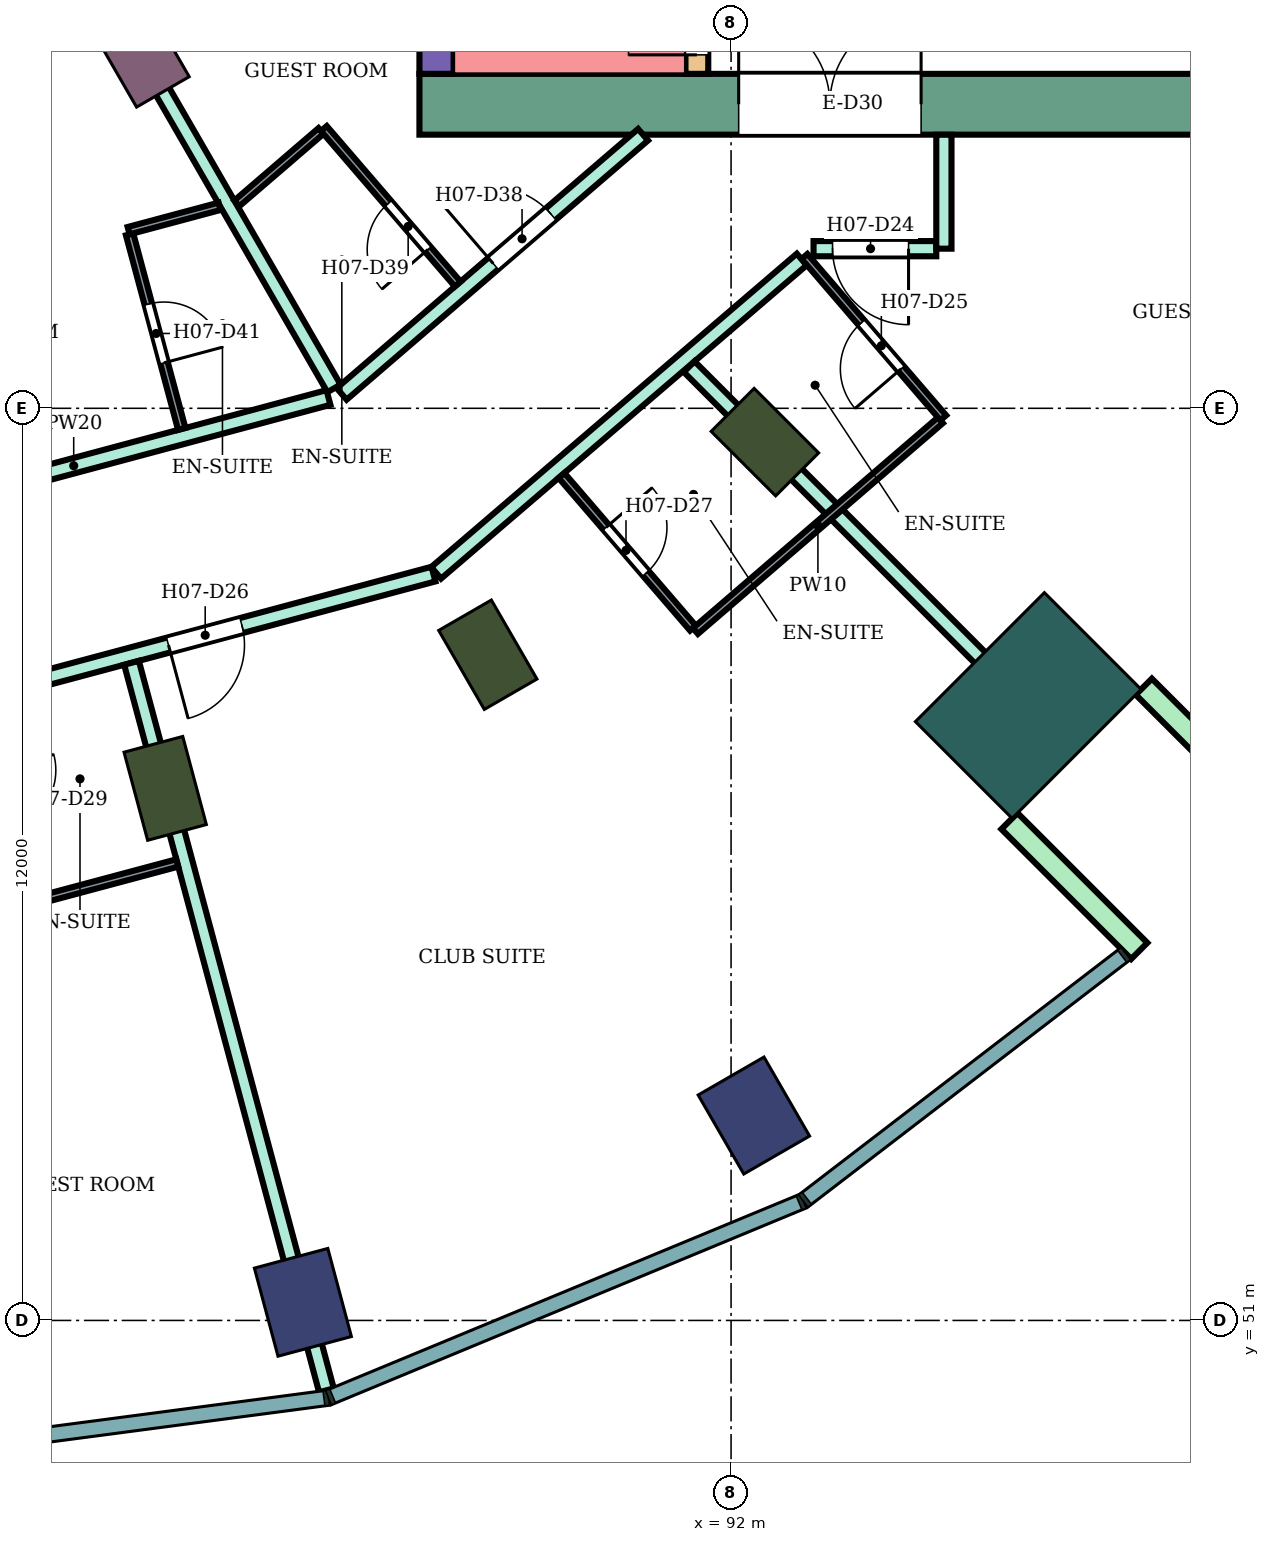
"""IFC4 building model, lengths in metres.
Left out: names, types, materials, properties, quantities, classifications, styles, units other than length and angle.
Written with IfcOpenShell. Run it as: python <this file> out.ifc"""

import sys

from ifc_helpers import new_model, si_unit, direction, frame, frame_2d, origin, origin_2d, place, context, subcontext, project, spatial, rectangle, extrude, element, fill, save


model = new_model("IFC4")
c1 = context("Model", 3, precision=1e-05, world=origin(), true_north=direction((0.0, 1.0)))
c2 = subcontext(c1, "Body", "Model", "MODEL_VIEW")
j1 = project(units=[si_unit("LENGTHUNIT", "METRE"), si_unit("PLANEANGLEUNIT", "RADIAN")], contexts=[c1])
p1 = place(None, origin())
s1 = spatial("IfcSite", under=j1, at=p1, CompositionType="ELEMENT")
p2 = place(p1, origin())
s2 = spatial("IfcBuilding", under=s1, at=p2, CompositionType="ELEMENT")
p3 = place(p2, frame((0.0, 0.0, 105.2)))
s3 = spatial("IfcBuildingStorey", under=s2, at=p3, CompositionType="ELEMENT", Elevation=105.2)
for number, where, z_axis, x_axis in (
    (1, (86.367, 51.238, 0.0), (0.0, 0.0, 1.0), (0.259, -0.966, 0.0)),
    (2, (92.3, 53.696, 0.0), (0.0, 0.0, 1.0), (0.5, -0.866, 0.0)),
):
    element("IfcColumn", number, at=place(p3, frame(where, z_axis=z_axis, x_axis=x_axis)), inside=s3, PredefinedType="COLUMN", context=c2, shape_type="SweptSolid", body=[
        extrude(rectangle(XDim=1.2, YDim=1.0, at=origin_2d()), origin(), (0.0, 0.0, 1.0), 3.8),
    ])
for number, where, z_axis, x_axis in (
    (3, (84.555, 58.0, 0.0), (0.0, 0.0, 1.0), (0.259, -0.966, 0.0)),
    (4, (88.8, 59.758, 0.0), (0.0, 0.0, 1.0), (0.5, -0.866, 0.0)),
    (5, (92.445, 62.555, 0.0), (0.0, 0.0, 1.0), (0.707, -0.707, 0.0)),
):
    element("IfcColumn", number, at=place(p3, frame(where, z_axis=z_axis, x_axis=x_axis)), inside=s3, PredefinedType="COLUMN", context=c2, shape_type="SweptSolid", body=[
        extrude(rectangle(XDim=1.2, YDim=0.8, at=origin_2d()), origin(), (0.0, 0.0, 1.0), 3.8),
    ])
p4 = place(p3, frame((84.3, 67.552, 0.0), z_axis=(0.0, 0.0, 1.0), x_axis=(0.5, -0.866025403784, 0.0)))
e6 = element("IfcColumn", 6, at=p4, inside=s3, PredefinedType="COLUMN", context=c2, shape_type="SweptSolid", body=[
    extrude(rectangle(XDim=0.9, YDim=0.8, at=origin_2d()), origin(), (0.0, 0.0, 1.0), 3.8),
])
p5 = place(p3, frame((95.91, 59.09, 0.0), z_axis=(0.0, 0.0, 1.0), x_axis=(0.707106781187, -0.707106781187, 0.0)))
e7 = element("IfcColumn", 7, at=p5, inside=s3, PredefinedType="COLUMN", context=c2, shape_type="SweptSolid", body=[
    extrude(rectangle(XDim=1.8, YDim=2.4, at=origin_2d()), origin(), (0.0, 0.0, 1.0), 3.8),
])
p6 = place(p3, frame((87.9, 67.0, 0.0), z_axis=(0.0, 0.0, 1.0), x_axis=(1.0, 0.0, 0.0)))
e8 = element("IfcWall", 8, at=p6, inside=s3, PredefinedType="SHEAR", context=c2, shape_type="SweptSolid", body=[
    extrude(rectangle(XDim=14.7, YDim=0.8, at=frame_2d((7.35, 0.0))), origin(), (0.0, 0.0, 1.0), 3.45),
])
p7 = place(p6, frame((4.2, 0.0, 0.0)))
e9 = element("IfcOpeningElement", 9, at=p7, cuts=e8, PredefinedType="OPENING", context=c2, shape_type="SweptSolid", body=[
    extrude(rectangle(XDim=2.4, YDim=2.4, at=frame_2d((1.2, 1.2))), frame((0.0, 0.41, 0.0), z_axis=(0.0, -1.0, 0.0), x_axis=(1.0, 0.0, 0.0)), (0.0, 0.0, 1.0), 0.82),
])
p8 = place(p3, frame((88.125, 67.4, 0.0), z_axis=(0.0, 0.0, 1.0), x_axis=(0.0, 1.0, 0.0)))
e10 = element("IfcWall", 10, at=p8, inside=s3, PredefinedType="SHEAR", context=c2, shape_type="SweptSolid", body=[
    extrude(rectangle(XDim=7.6, YDim=0.45, at=frame_2d((3.8, 0.0))), origin(), (0.0, 0.0, 1.0), 3.45),
])
p9 = place(p3, frame((91.55, 67.4, 0.0), z_axis=(0.0, 0.0, 1.0), x_axis=(0.0, 1.0, 0.0)))
e11 = element("IfcWall", 11, at=p9, inside=s3, PredefinedType="SHEAR", context=c2, shape_type="SweptSolid", body=[
    extrude(rectangle(XDim=7.6, YDim=0.3, at=frame_2d((3.8, 0.0))), origin(), (0.0, 0.0, 1.0), 3.45),
])
p10 = place(p9, frame((0.25, 0.0, 0.0)))
e12 = element("IfcOpeningElement", 12, at=p10, cuts=e11, PredefinedType="OPENING", context=c2, shape_type="SweptSolid", body=[
    extrude(rectangle(XDim=0.9, YDim=2.1, at=frame_2d((0.45, 1.05))), frame((0.0, 0.16, 0.0), z_axis=(0.0, -1.0, 0.0), x_axis=(1.0, 0.0, 0.0)), (0.0, 0.0, 1.0), 0.32),
])
for number, where, z_axis, x_axis in (
    (13, (95.662, 57.57, 0.0), (0.0, 0.0, 1.0), (0.707, -0.707, 0.0)),
    (14, (97.43, 59.338, 0.0), (0.0, 0.0, 1.0), (0.707, -0.707, 0.0)),
):
    element("IfcWall", number, at=place(p3, frame(where, z_axis=z_axis, x_axis=x_axis)), inside=s3, PredefinedType="NOTDEFINED", context=c2, shape_type="SweptSolid", body=[
        extrude(rectangle(XDim=2.416, YDim=0.3, at=frame_2d((1.208, 0.0))), origin(), (0.0, 0.0, 1.0), 3.8),
    ])
p11 = place(p3, frame((80.0, 67.396, 0.0), z_axis=(0.0, 0.0, 1.0), x_axis=(0.965933654434, 0.258789828301, 0.0)))
e15 = element("IfcWall", 15, at=p11, inside=s3, PredefinedType="NOTDEFINED", context=c2, shape_type="SweptSolid", body=[
    extrude(rectangle(XDim=3.936, YDim=0.2, at=frame_2d((1.968, 0.0))), origin(), (0.0, 0.0, 1.0), 3.8),
])
p12 = place(p11, frame((0.468, 0.0, 0.9)))
e16 = element("IfcOpeningElement", 16, at=p12, cuts=e15, PredefinedType="OPENING", context=c2, shape_type="SweptSolid", body=[
    extrude(rectangle(XDim=3.0, YDim=2.3, at=frame_2d((1.5, 1.15))), frame((0.0, 0.11, 0.0), z_axis=(0.0, -1.0, 0.0), x_axis=(1.0, 0.0, 0.0)), (0.0, 0.0, 1.0), 0.22),
])
p13 = place(p3, frame((80.0, 58.654, 0.0), z_axis=(0.0, 0.0, 1.0), x_axis=(0.965979808777, 0.25861749561, 0.0)))
e17 = element("IfcWall", 17, at=p13, inside=s3, PredefinedType="PARTITIONING", context=c2, shape_type="SweptSolid", body=[
    extrude(rectangle(XDim=8.37, YDim=0.2, at=frame_2d((4.185, 0.0))), origin(), (0.0, 0.0, 1.0), 3.35),
])
p14 = place(p13, frame((4.76, 0.0, 0.0)))
e18 = element("IfcOpeningElement", 18, at=p14, cuts=e17, PredefinedType="OPENING", context=c2, shape_type="SweptSolid", body=[
    extrude(rectangle(XDim=1.0, YDim=2.1, at=frame_2d((0.5, 1.05))), frame((0.0, 0.11, 0.0), z_axis=(0.0, -1.0, 0.0), x_axis=(1.0, 0.0, 0.0)), (0.0, 0.0, 1.0), 0.22),
])
p15 = place(p13, frame((0.55, 0.0, 0.0)))
e19 = element("IfcOpeningElement", 19, at=p15, cuts=e17, PredefinedType="OPENING", context=c2, shape_type="SweptSolid", body=[
    extrude(rectangle(XDim=1.0, YDim=2.1, at=frame_2d((0.5, 1.05))), frame((0.0, 0.11, 0.0), z_axis=(0.0, -1.0, 0.0), x_axis=(1.0, 0.0, 0.0)), (0.0, 0.0, 1.0), 0.22),
])
p16 = place(p3, frame((80.0, 61.346, 0.0), z_axis=(0.0, 0.0, 1.0), x_axis=(0.965924181808, 0.258825182312, 0.0)))
e20 = element("IfcWall", 20, at=p16, inside=s3, PredefinedType="PARTITIONING", context=c2, shape_type="SweptSolid", body=[
    extrude(rectangle(XDim=6.94, YDim=0.2, at=frame_2d((3.47, 0.0))), origin(), (0.0, 0.0, 1.0), 3.35),
])
p17 = place(p16, frame((0.55, 0.0, 0.0)))
e21 = element("IfcOpeningElement", 21, at=p17, cuts=e20, PredefinedType="OPENING", context=c2, shape_type="SweptSolid", body=[
    extrude(rectangle(XDim=1.0, YDim=2.1, at=frame_2d((0.5, 1.05))), frame((0.0, 0.11, 0.0), z_axis=(0.0, -1.0, 0.0), x_axis=(1.0, 0.0, 0.0)), (0.0, 0.0, 1.0), 0.22),
])
p18 = place(p3, frame((83.849, 68.333, 0.0), z_axis=(0.0, 0.0, 1.0), x_axis=(0.499901724708, -0.866082135617, 0.0)))
e22 = element("IfcWall", 22, at=p18, inside=s3, PredefinedType="PARTITIONING", context=c2, shape_type="SweptSolid", body=[
    extrude(rectangle(XDim=5.855, YDim=0.2, at=frame_2d((2.928, 0.0))), origin(), (0.0, 0.0, 1.0), 3.35),
])
p19 = place(p3, frame((84.112, 59.652, 0.0), z_axis=(0.0, 0.0, 1.0), x_axis=(0.25878658041, -0.965934524593, 0.0)))
e23 = element("IfcWall", 23, at=p19, inside=s3, PredefinedType="PARTITIONING", context=c2, shape_type="SweptSolid", body=[
    extrude(rectangle(XDim=9.909, YDim=0.2, at=frame_2d((4.954, 0.0))), origin(), (0.0, 0.0, 1.0), 3.35),
])
p20 = place(p3, frame((86.877, 63.189, 0.0), z_axis=(0.0, 0.0, 1.0), x_axis=(0.758164888471, 0.652062881853, 0.0)))
e24 = element("IfcWall", 24, at=p20, inside=s3, PredefinedType="PARTITIONING", context=c2, shape_type="SweptSolid", body=[
    extrude(rectangle(XDim=5.23, YDim=0.2, at=frame_2d((2.615, 0.0))), origin(), (0.0, 0.0, 1.0), 3.35),
])
p21 = place(p20, frame((2.63, 0.0, 0.0)))
e25 = element("IfcOpeningElement", 25, at=p21, cuts=e24, PredefinedType="OPENING", context=c2, shape_type="SweptSolid", body=[
    extrude(rectangle(XDim=1.0, YDim=2.1, at=frame_2d((0.5, 1.05))), frame((0.0, 0.11, 0.0), z_axis=(0.0, -1.0, 0.0), x_axis=(1.0, 0.0, 0.0)), (0.0, 0.0, 1.0), 0.22),
])
p22 = place(p3, frame((88.119, 60.835, 0.0), z_axis=(0.0, 0.0, 1.0), x_axis=(0.759278362444, 0.650765985838, 0.0)))
e26 = element("IfcWall", 26, at=p22, inside=s3, PredefinedType="PARTITIONING", context=c2, shape_type="SweptSolid", body=[
    extrude(rectangle(XDim=6.336, YDim=0.2, at=frame_2d((3.168, 0.0))), origin(), (0.0, 0.0, 1.0), 3.35),
])
p23 = place(p3, frame((91.449, 63.547, 0.0), z_axis=(0.0, 0.0, 1.0), x_axis=(0.706984798626, -0.707228742708, 0.0)))
e27 = element("IfcWall", 27, at=p23, inside=s3, PredefinedType="PARTITIONING", context=c2, shape_type="SweptSolid", body=[
    extrude(rectangle(XDim=7.006, YDim=0.2, at=frame_2d((3.503, 0.0))), origin(), (0.0, 0.0, 1.0), 3.35),
])
p24 = place(p3, frame((93.085, 65.1, 0.0), z_axis=(0.0, 0.0, 1.0), x_axis=(1.0, 0.0, 0.0)))
e28 = element("IfcWall", 28, at=p24, inside=s3, PredefinedType="PARTITIONING", context=c2, shape_type="SweptSolid", body=[
    extrude(rectangle(XDim=1.615, YDim=0.2, at=frame_2d((0.808, 0.0))), origin(), (0.0, 0.0, 1.0), 3.35),
])
p25 = place(p24, frame((0.25, 0.0, 0.0)))
e29 = element("IfcOpeningElement", 29, at=p25, cuts=e28, PredefinedType="OPENING", context=c2, shape_type="SweptSolid", body=[
    extrude(rectangle(XDim=1.0, YDim=2.1, at=frame_2d((0.5, 1.05))), frame((0.0, 0.11, 0.0), z_axis=(0.0, -1.0, 0.0), x_axis=(1.0, 0.0, 0.0)), (0.0, 0.0, 1.0), 0.22),
])
p26 = place(p3, frame((94.8, 65.1, 0.0), z_axis=(0.0, 0.0, 1.0), x_axis=(0.0, 1.0, 0.0)))
e30 = element("IfcWall", 30, at=p26, inside=s3, PredefinedType="PARTITIONING", context=c2, shape_type="SweptSolid", body=[
    extrude(rectangle(XDim=1.499, YDim=0.2, at=frame_2d((0.75, 0.0))), origin(), (0.0, 0.0, 1.0), 3.35),
])
p27 = place(p3, frame((82.782, 56.501, 0.0), z_axis=(0.0, 0.0, 1.0), x_axis=(0.966003594778, 0.258528634539, 0.0)))
e31 = element("IfcWall", 31, at=p27, inside=s3, PredefinedType="PARTITIONING", context=c2, shape_type="SweptSolid", body=[
    extrude(rectangle(XDim=2.0, YDim=0.1, at=frame_2d((1.0, 0.0))), origin(), (0.0, 0.0, 1.0), 3.35),
])
p28 = place(p3, frame((84.087, 65.289, 0.0), z_axis=(0.0, 0.0, 1.0), x_axis=(0.258929459649, -0.965896234037, 0.0)))
e32 = element("IfcWall", 32, at=p28, inside=s3, PredefinedType="PARTITIONING", context=c2, shape_type="SweptSolid", body=[
    extrude(rectangle(XDim=2.65, YDim=0.1, at=frame_2d((1.325, 0.0))), origin(), (0.0, 0.0, 1.0), 3.35),
])
p29 = place(p28, frame((0.95, 0.0, 0.0)))
e33 = element("IfcOpeningElement", 33, at=p29, cuts=e32, PredefinedType="OPENING", context=c2, shape_type="SweptSolid", body=[
    extrude(rectangle(XDim=0.8, YDim=2.1, at=frame_2d((0.4, 1.05))), frame((0.0, 0.06, 0.0), z_axis=(0.0, -1.0, 0.0), x_axis=(1.0, 0.0, 0.0)), (0.0, 0.0, 1.0), 0.12),
])
p30 = place(p3, frame((84.074, 65.337, 0.0), z_axis=(0.0, 0.0, 1.0), x_axis=(0.965949810352, 0.258729518766, 0.0)))
e34 = element("IfcWall", 34, at=p30, inside=s3, PredefinedType="PARTITIONING", context=c2, shape_type="SweptSolid", body=[
    extrude(rectangle(XDim=1.239, YDim=0.1, at=frame_2d((0.62, 0.0))), origin(), (0.0, 0.0, 1.0), 3.35),
])
p31 = place(p3, frame((85.497, 65.696, 0.0), z_axis=(0.0, 0.0, 1.0), x_axis=(0.75817032582, 0.652056559698, 0.0)))
e35 = element("IfcWall", 35, at=p31, inside=s3, PredefinedType="PARTITIONING", context=c2, shape_type="SweptSolid", body=[
    extrude(rectangle(XDim=1.461, YDim=0.1, at=frame_2d((0.73, 0.0))), origin(), (0.0, 0.0, 1.0), 3.35),
])
p32 = place(p3, frame((86.643, 66.681, 0.0), z_axis=(0.0, 0.0, 1.0), x_axis=(0.652264876065, -0.757991115682, 0.0)))
e36 = element("IfcWall", 36, at=p32, inside=s3, PredefinedType="PARTITIONING", context=c2, shape_type="SweptSolid", body=[
    extrude(rectangle(XDim=2.699, YDim=0.1, at=frame_2d((1.35, 0.0))), origin(), (0.0, 0.0, 1.0), 3.35),
])
p33 = place(p32, frame((1.3, 0.0, 0.0)))
e37 = element("IfcOpeningElement", 37, at=p33, cuts=e36, PredefinedType="OPENING", context=c2, shape_type="SweptSolid", body=[
    extrude(rectangle(XDim=0.8, YDim=2.1, at=frame_2d((0.4, 1.05))), frame((0.0, 0.06, 0.0), z_axis=(0.0, -1.0, 0.0), x_axis=(1.0, 0.0, 0.0)), (0.0, 0.0, 1.0), 0.12),
])
p34 = place(p3, frame((89.77, 62.116, 0.0), z_axis=(0.0, 0.0, 1.0), x_axis=(0.652481981265, -0.757804238656, 0.0)))
e38 = element("IfcWall", 38, at=p34, inside=s3, PredefinedType="PARTITIONING", context=c2, shape_type="SweptSolid", body=[
    extrude(rectangle(XDim=2.649, YDim=0.1, at=frame_2d((1.325, 0.0))), origin(), (0.0, 0.0, 1.0), 3.35),
])
p35 = place(p34, frame((0.899, 0.0, 0.0)))
e39 = element("IfcOpeningElement", 39, at=p35, cuts=e38, PredefinedType="OPENING", context=c2, shape_type="SweptSolid", body=[
    extrude(rectangle(XDim=0.8, YDim=2.1, at=frame_2d((0.4, 1.05))), frame((0.0, 0.06, 0.0), z_axis=(0.0, -1.0, 0.0), x_axis=(1.0, 0.0, 0.0)), (0.0, 0.0, 1.0), 0.12),
])
p36 = place(p3, frame((91.531, 60.07, 0.0), z_axis=(0.0, 0.0, 1.0), x_axis=(0.758043227135, 0.652204312922, 0.0)))
e40 = element("IfcWall", 40, at=p36, inside=s3, PredefinedType="PARTITIONING", context=c2, shape_type="SweptSolid", body=[
    extrude(rectangle(XDim=4.251, YDim=0.1, at=frame_2d((2.125, 0.0))), origin(), (0.0, 0.0, 1.0), 3.35),
])
p37 = place(p3, frame((92.966, 64.998, 0.0), z_axis=(0.0, 0.0, 1.0), x_axis=(0.65205430601, -0.758172264076, 0.0)))
e41 = element("IfcWall", 41, at=p37, inside=s3, PredefinedType="PARTITIONING", context=c2, shape_type="SweptSolid", body=[
    extrude(rectangle(XDim=2.8, YDim=0.1, at=frame_2d((1.4, 0.0))), origin(), (0.0, 0.0, 1.0), 3.35),
])
p38 = place(p37, frame((1.15, 0.0, 0.0)))
e42 = element("IfcOpeningElement", 42, at=p38, cuts=e41, PredefinedType="OPENING", context=c2, shape_type="SweptSolid", body=[
    extrude(rectangle(XDim=0.8, YDim=2.1, at=frame_2d((0.4, 1.05))), frame((0.0, 0.06, 0.0), z_axis=(0.0, -1.0, 0.0), x_axis=(1.0, 0.0, 0.0)), (0.0, 0.0, 1.0), 0.12),
])
p39 = place(p12, origin())
e43 = element("IfcWindow", 43, at=p39, inside=s3, PartitioningType="SINGLE_PANEL", PredefinedType="WINDOW", context=c2, shape_type="SweptSolid", body=[
    extrude(rectangle(XDim=3.0, YDim=2.3, at=frame_2d((1.5, 1.15))), frame((0.0, 0.03, 0.0), z_axis=(0.0, -1.0, 0.0), x_axis=(1.0, 0.0, 0.0)), (0.0, 0.0, 1.0), 0.06),
])
fill(e16, e43)
p40 = place(p25, frame((1.0, 0.0, 0.0), z_axis=(0.0, 0.0, 1.0), x_axis=(-1.0, 0.0, 0.0)))
e44 = element("IfcDoor", 44, at=p40, inside=s3, OperationType="SINGLE_SWING_LEFT", PredefinedType="DOOR", context=c2, shape_type="SweptSolid", body=[
    extrude(rectangle(XDim=1.0, YDim=2.1, at=frame_2d((0.5, 1.05))), frame((0.0, 0.025, 0.0), z_axis=(0.0, -1.0, 0.0), x_axis=(1.0, 0.0, 0.0)), (0.0, 0.0, 1.0), 0.05),
])
fill(e29, e44)
p41 = place(p38, frame((0.8, 0.0, 0.0), z_axis=(0.0, 0.0, 1.0), x_axis=(-1.0, 0.0, 0.0)))
e45 = element("IfcDoor", 45, at=p41, inside=s3, OperationType="SINGLE_SWING_LEFT", PredefinedType="DOOR", context=c2, shape_type="SweptSolid", body=[
    extrude(rectangle(XDim=0.8, YDim=2.1, at=frame_2d((0.4, 1.05))), frame((0.0, 0.025, 0.0), z_axis=(0.0, -1.0, 0.0), x_axis=(1.0, 0.0, 0.0)), (0.0, 0.0, 1.0), 0.05),
])
fill(e42, e45)
p42 = place(p14, frame((1.0, 0.0, 0.0), z_axis=(0.0, 0.0, 1.0), x_axis=(-1.0, 0.0, 0.0)))
e46 = element("IfcDoor", 46, at=p42, inside=s3, OperationType="SINGLE_SWING_RIGHT", PredefinedType="DOOR", context=c2, shape_type="SweptSolid", body=[
    extrude(rectangle(XDim=1.0, YDim=2.1, at=frame_2d((0.5, 1.05))), frame((0.0, 0.025, 0.0), z_axis=(0.0, -1.0, 0.0), x_axis=(1.0, 0.0, 0.0)), (0.0, 0.0, 1.0), 0.05),
])
fill(e18, e46)
p43 = place(p35, origin())
e47 = element("IfcDoor", 47, at=p43, inside=s3, OperationType="SINGLE_SWING_LEFT", PredefinedType="DOOR", context=c2, shape_type="SweptSolid", body=[
    extrude(rectangle(XDim=0.8, YDim=2.1, at=frame_2d((0.4, 1.05))), frame((0.0, 0.025, 0.0), z_axis=(0.0, -1.0, 0.0), x_axis=(1.0, 0.0, 0.0)), (0.0, 0.0, 1.0), 0.05),
])
fill(e39, e47)
p44 = place(p21, origin())
e48 = element("IfcDoor", 48, at=p44, inside=s3, OperationType="SINGLE_SWING_LEFT", PredefinedType="DOOR", context=c2, shape_type="SweptSolid", body=[
    extrude(rectangle(XDim=1.0, YDim=2.1, at=frame_2d((0.5, 1.05))), frame((0.0, 0.025, 0.0), z_axis=(0.0, -1.0, 0.0), x_axis=(1.0, 0.0, 0.0)), (0.0, 0.0, 1.0), 0.05),
])
fill(e25, e48)
p45 = place(p33, frame((0.8, 0.0, 0.0), z_axis=(0.0, 0.0, 1.0), x_axis=(-1.0, 0.0, 0.0)))
e49 = element("IfcDoor", 49, at=p45, inside=s3, OperationType="SINGLE_SWING_LEFT", PredefinedType="DOOR", context=c2, shape_type="SweptSolid", body=[
    extrude(rectangle(XDim=0.8, YDim=2.1, at=frame_2d((0.4, 1.05))), frame((0.0, 0.025, 0.0), z_axis=(0.0, -1.0, 0.0), x_axis=(1.0, 0.0, 0.0)), (0.0, 0.0, 1.0), 0.05),
])
fill(e37, e49)
p46 = place(p29, origin())
e50 = element("IfcDoor", 50, at=p46, inside=s3, OperationType="SINGLE_SWING_RIGHT", PredefinedType="DOOR", context=c2, shape_type="SweptSolid", body=[
    extrude(rectangle(XDim=0.8, YDim=2.1, at=frame_2d((0.4, 1.05))), frame((0.0, 0.025, 0.0), z_axis=(0.0, -1.0, 0.0), x_axis=(1.0, 0.0, 0.0)), (0.0, 0.0, 1.0), 0.05),
])
fill(e33, e50)
p47 = place(p10, origin())
e51 = element("IfcDoor", 51, at=p47, inside=s3, OperationType="SINGLE_SWING_LEFT", PredefinedType="DOOR", context=c2, shape_type="SweptSolid", body=[
    extrude(rectangle(XDim=0.9, YDim=2.1, at=frame_2d((0.45, 1.05))), frame((0.0, 0.025, 0.0), z_axis=(0.0, -1.0, 0.0), x_axis=(1.0, 0.0, 0.0)), (0.0, 0.0, 1.0), 0.05),
])
fill(e12, e51)
p48 = place(p7, origin())
e52 = element("IfcDoor", 52, at=p48, inside=s3, OperationType="DOUBLE_DOOR_SINGLE_SWING", PredefinedType="DOOR", context=c2, shape_type="SweptSolid", body=[
    extrude(rectangle(XDim=2.4, YDim=2.4, at=frame_2d((1.2, 1.2))), frame((0.0, 0.025, 0.0), z_axis=(0.0, -1.0, 0.0), x_axis=(1.0, 0.0, 0.0)), (0.0, 0.0, 1.0), 0.05),
])
fill(e9, e52)
save(model, sys.argv[1])
